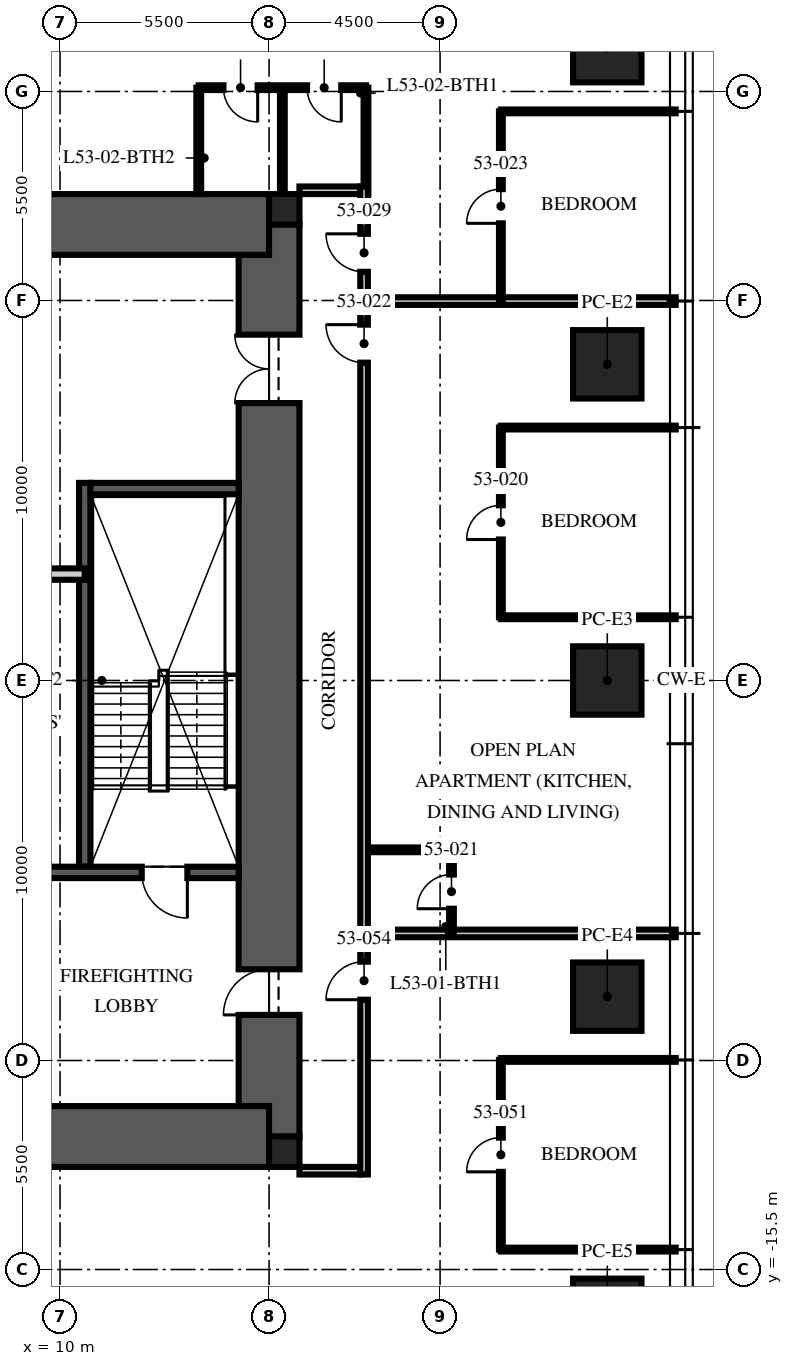
"""IFC4 building model, lengths in metres.
Left out: names, types, materials, properties, quantities, classifications, styles, units other than length and angle.
Written with IfcOpenShell. Run it as: python <this file> out.ifc"""

import sys

from ifc_helpers import new_model, si_unit, direction, frame, frame_2d, origin, origin_2d, place, context, subcontext, project, spatial, rectangle, extrude, element, fill, save


model = new_model("IFC4")
c1 = context("Model", 3, precision=1e-05, world=origin(), true_north=direction((0.0, 1.0)))
c2 = subcontext(c1, "Body", "Model", "MODEL_VIEW")
j1 = project(units=[si_unit("LENGTHUNIT", "METRE"), si_unit("PLANEANGLEUNIT", "RADIAN")], contexts=[c1])
p1 = place(None, origin())
s1 = spatial("IfcSite", under=j1, at=p1, CompositionType="ELEMENT")
p2 = place(p1, origin())
s2 = spatial("IfcBuilding", under=s1, at=p2, CompositionType="ELEMENT")
p3 = place(p2, frame((0.0, 0.0, 214.5)))
s3 = spatial("IfcBuildingStorey", under=s2, at=p3, CompositionType="ELEMENT", Elevation=214.5)
p4 = place(p3, frame((15.5, -12.0, -0.25), z_axis=(0.0, 0.0, 1.0), x_axis=(0.0, 1.0, 0.0)))
e1 = element("IfcWall", 1, at=p4, inside=s3, PredefinedType="SHEAR", context=c2, shape_type="SweptSolid", body=[
    extrude(rectangle(XDim=24.0, YDim=1.6, at=frame_2d((12.0, 0.0))), origin(), (0.0, 0.0, 1.0), 3.75),
])
p5 = place(p4, frame((3.2, 0.0, 0.25)))
e2 = element("IfcOpeningElement", 2, at=p5, cuts=e1, PredefinedType="OPENING", context=c2, shape_type="SweptSolid", body=[
    extrude(rectangle(XDim=1.2, YDim=2.1, at=frame_2d((0.6, 1.05))), frame((0.0, 0.81, 0.0), z_axis=(0.0, -1.0, 0.0), x_axis=(1.0, 0.0, 0.0)), (0.0, 0.0, 1.0), 1.62),
])
p6 = place(p4, frame((19.3, 0.0, 0.25)))
e3 = element("IfcOpeningElement", 3, at=p6, cuts=e1, PredefinedType="OPENING", context=c2, shape_type="SweptSolid", body=[
    extrude(rectangle(XDim=1.8, YDim=2.1, at=frame_2d((0.9, 1.05))), frame((0.0, 0.81, 0.0), z_axis=(0.0, -1.0, 0.0), x_axis=(1.0, 0.0, 0.0)), (0.0, 0.0, 1.0), 1.62),
])
for number, where, z_axis, x_axis in (
    (4, (-15.5, 12.0, -0.25), (0.0, 0.0, 1.0), (1.0, 0.0, 0.0)),
    (5, (-15.5, -12.0, -0.25), (0.0, 0.0, 1.0), (1.0, 0.0, 0.0)),
):
    element("IfcWall", number, at=place(p3, frame(where, z_axis=z_axis, x_axis=x_axis)), inside=s3, PredefinedType="SHEAR", context=c2, shape_type="SweptSolid", body=[
        extrude(rectangle(XDim=31.0, YDim=1.6, at=frame_2d((15.5, 0.0))), origin(), (0.0, 0.0, 1.0), 3.75),
    ])
for number, where, z_axis, x_axis in (
    (6, (15.9, 12.4, -0.25), (0.0, 0.0, 1.0), (1.0, 0.0, 0.0)),
    (7, (15.9, -12.4, -0.25), (0.0, 0.0, 1.0), (1.0, 0.0, 0.0)),
):
    element("IfcColumn", number, at=place(p3, frame(where, z_axis=z_axis, x_axis=x_axis)), inside=s3, PredefinedType="COLUMN", context=c2, shape_type="SweptSolid", body=[
        extrude(rectangle(XDim=0.8, YDim=0.8, at=origin_2d()), origin(), (0.0, 0.0, 1.0), 3.75),
    ])
for number, where, z_axis, x_axis in (
    (8, (24.4, 16.64, 0.0), (0.0, 0.0, 1.0), (0.0, 1.0, 0.0)),
    (9, (24.4, 8.32, 0.0), (0.0, 0.0, 1.0), (0.0, 1.0, 0.0)),
    (10, (24.4, 0.0, 0.0), (0.0, 0.0, 1.0), (0.0, 1.0, 0.0)),
    (11, (24.4, -8.32, 0.0), (0.0, 0.0, 1.0), (0.0, 1.0, 0.0)),
    (12, (24.4, -16.64, 0.0), (0.0, 0.0, 1.0), (0.0, 1.0, 0.0)),
):
    element("IfcColumn", number, at=place(p3, frame(where, z_axis=z_axis, x_axis=x_axis)), inside=s3, PredefinedType="COLUMN", context=c2, shape_type="SweptSolid", body=[
        extrude(rectangle(XDim=1.8, YDim=1.8, at=origin_2d()), origin(), (0.0, 0.0, 1.0), 3.75),
    ])
p7 = place(p3, frame((10.65, -4.9, 0.0), z_axis=(0.0, 0.0, 1.0), x_axis=(0.0, 1.0, 0.0)))
e13 = element("IfcWall", 13, at=p7, inside=s3, PredefinedType="SOLIDWALL", context=c2, shape_type="SweptSolid", body=[
    extrude(rectangle(XDim=10.1, YDim=0.3, at=frame_2d((5.05, 0.0))), origin(), (0.0, 0.0, 1.0), 3.5),
])
p8 = place(p3, frame((14.7, -5.05, 0.0), z_axis=(0.0, 0.0, 1.0), x_axis=(-1.0, 0.0, 0.0)))
e14 = element("IfcWall", 14, at=p8, inside=s3, PredefinedType="SOLIDWALL", context=c2, shape_type="SweptSolid", body=[
    extrude(rectangle(XDim=5.9, YDim=0.3, at=frame_2d((2.95, 0.0))), origin(), (0.0, 0.0, 1.0), 3.5),
])
p9 = place(p8, frame((1.35, 0.0, 0.0)))
e15 = element("IfcOpeningElement", 15, at=p9, cuts=e14, PredefinedType="OPENING", context=c2, shape_type="SweptSolid", body=[
    extrude(rectangle(XDim=1.2, YDim=2.1, at=frame_2d((0.6, 1.05))), frame((0.0, 0.16, 0.0), z_axis=(0.0, -1.0, 0.0), x_axis=(1.0, 0.0, 0.0)), (0.0, 0.0, 1.0), 0.32),
])
p10 = place(p3, frame((14.7, 5.05, 0.0), z_axis=(0.0, 0.0, 1.0), x_axis=(-1.0, 0.0, 0.0)))
e16 = element("IfcWall", 16, at=p10, inside=s3, PredefinedType="SOLIDWALL", context=c2, shape_type="SweptSolid", body=[
    extrude(rectangle(XDim=3.9, YDim=0.3, at=frame_2d((1.95, 0.0))), origin(), (0.0, 0.0, 1.0), 3.5),
])
p11 = place(p3, frame((-10.65, 2.8, 0.0), z_axis=(0.0, 0.0, 1.0), x_axis=(1.0, 0.0, 0.0)))
e17 = element("IfcWall", 17, at=p11, inside=s3, PredefinedType="PARTITIONING", context=c2, shape_type="SweptSolid", body=[
    extrude(rectangle(XDim=21.3, YDim=0.3, at=frame_2d((10.65, 0.0))), origin(), (0.0, 0.0, 1.0), 3.5),
])
p12 = place(p11, frame((10.05, 0.0, 0.0)))
e18 = element("IfcOpeningElement", 18, at=p12, cuts=e17, PredefinedType="OPENING", context=c2, shape_type="SweptSolid", body=[
    extrude(rectangle(XDim=1.2, YDim=2.1, at=frame_2d((0.6, 1.05))), frame((0.0, 0.16, 0.0), z_axis=(0.0, -1.0, 0.0), x_axis=(1.0, 0.0, 0.0)), (0.0, 0.0, 1.0), 0.32),
])
p13 = place(p11, frame((1.493, 0.0, 0.0)))
e19 = element("IfcOpeningElement", 19, at=p13, cuts=e17, PredefinedType="OPENING", context=c2, shape_type="SweptSolid", body=[
    extrude(rectangle(XDim=0.9, YDim=2.1, at=frame_2d((0.45, 1.05))), frame((0.0, 0.16, 0.0), z_axis=(0.0, -1.0, 0.0), x_axis=(1.0, 0.0, 0.0)), (0.0, 0.0, 1.0), 0.32),
])
p14 = place(p11, frame((18.836, 0.0, 0.0)))
e20 = element("IfcOpeningElement", 20, at=p14, cuts=e17, PredefinedType="OPENING", context=c2, shape_type="SweptSolid", body=[
    extrude(rectangle(XDim=0.9, YDim=2.1, at=frame_2d((0.45, 1.05))), frame((0.0, 0.16, 0.0), z_axis=(0.0, -1.0, 0.0), x_axis=(1.0, 0.0, 0.0)), (0.0, 0.0, 1.0), 0.32),
])
for number, where, z_axis, x_axis in (
    (21, (16.3, 12.9, 0.0), (0.0, 0.0, 1.0), (1.0, 0.0, 0.0)),
    (22, (16.3, -12.9, 0.0), (0.0, 0.0, 1.0), (1.0, 0.0, 0.0)),
):
    element("IfcWall", number, at=place(p3, frame(where, z_axis=z_axis, x_axis=x_axis)), inside=s3, PredefinedType="PARTITIONING", context=c2, shape_type="SweptSolid", body=[
        extrude(rectangle(XDim=1.6, YDim=0.2, at=frame_2d((0.8, 0.0))), origin(), (0.0, 0.0, 1.0), 2.3),
    ])
p15 = place(p3, frame((18.1, -6.656, 0.0), z_axis=(0.0, 0.0, 1.0), x_axis=(1.0, 0.0, 0.0)))
e23 = element("IfcWall", 23, at=p15, inside=s3, PredefinedType="PARTITIONING", context=c2, shape_type="SweptSolid", body=[
    extrude(rectangle(XDim=8.1, YDim=0.2, at=frame_2d((4.05, 0.0))), origin(), (0.0, 0.0, 1.0), 2.91),
])
for number, where, z_axis, x_axis in (
    (24, (21.6, 1.664, 0.0), (0.0, 0.0, 1.0), (1.0, 0.0, 0.0)),
    (25, (21.6, 6.656, 0.0), (0.0, 0.0, 1.0), (1.0, 0.0, 0.0)),
):
    element("IfcWall", number, at=place(p3, frame(where, z_axis=z_axis, x_axis=x_axis)), inside=s3, PredefinedType="PARTITIONING", context=c2, shape_type="SweptSolid", body=[
        extrude(rectangle(XDim=4.6, YDim=0.1, at=frame_2d((2.3, 0.0))), origin(), (0.0, 0.0, 1.0), 2.91),
    ])
p16 = place(p3, frame((18.1, 9.984, 0.0), z_axis=(0.0, 0.0, 1.0), x_axis=(1.0, 0.0, 0.0)))
e26 = element("IfcWall", 26, at=p16, inside=s3, PredefinedType="PARTITIONING", context=c2, shape_type="SweptSolid", body=[
    extrude(rectangle(XDim=8.1, YDim=0.2, at=frame_2d((4.05, 0.0))), origin(), (0.0, 0.0, 1.0), 2.91),
])
for number, where, z_axis, x_axis in (
    (27, (21.6, 14.976, 0.0), (0.0, 0.0, 1.0), (1.0, 0.0, 0.0)),
    (28, (21.6, -14.976, 0.0), (0.0, 0.0, 1.0), (1.0, 0.0, 0.0)),
    (29, (21.6, -9.984, 0.0), (0.0, 0.0, 1.0), (1.0, 0.0, 0.0)),
):
    element("IfcWall", number, at=place(p3, frame(where, z_axis=z_axis, x_axis=x_axis)), inside=s3, PredefinedType="PARTITIONING", context=c2, shape_type="SweptSolid", body=[
        extrude(rectangle(XDim=4.6, YDim=0.1, at=frame_2d((2.3, 0.0))), origin(), (0.0, 0.0, 1.0), 2.91),
    ])
p17 = place(p3, frame((21.6, 1.664, 0.0), z_axis=(0.0, 0.0, 1.0), x_axis=(0.0, 1.0, 0.0)))
e30 = element("IfcWall", 30, at=p17, inside=s3, PredefinedType="PARTITIONING", context=c2, shape_type="SweptSolid", body=[
    extrude(rectangle(XDim=4.992, YDim=0.1, at=frame_2d((2.496, 0.0))), origin(), (0.0, 0.0, 1.0), 2.81),
])
p18 = place(p17, frame((2.046, 0.0, 0.0)))
e31 = element("IfcOpeningElement", 31, at=p18, cuts=e30, PredefinedType="OPENING", context=c2, shape_type="SweptSolid", body=[
    extrude(rectangle(XDim=0.9, YDim=2.1, at=frame_2d((0.45, 1.05))), frame((0.0, 0.06, 0.0), z_axis=(0.0, -1.0, 0.0), x_axis=(1.0, 0.0, 0.0)), (0.0, 0.0, 1.0), 0.12),
])
p19 = place(p3, frame((20.3, -6.656, 0.0), z_axis=(0.0, 0.0, 1.0), x_axis=(0.0, 1.0, 0.0)))
e32 = element("IfcWall", 32, at=p19, inside=s3, PredefinedType="PARTITIONING", context=c2, shape_type="SweptSolid", body=[
    extrude(rectangle(XDim=2.2, YDim=0.125, at=frame_2d((1.1, 0.0))), origin(), (0.0, 0.0, 1.0), 3.5),
])
p20 = place(p19, frame((0.65, 0.0, 0.0)))
e33 = element("IfcOpeningElement", 33, at=p20, cuts=e32, PredefinedType="OPENING", context=c2, shape_type="SweptSolid", body=[
    extrude(rectangle(XDim=0.9, YDim=2.1, at=frame_2d((0.45, 1.05))), frame((0.0, 0.073, 0.0), z_axis=(0.0, -1.0, 0.0), x_axis=(1.0, 0.0, 0.0)), (0.0, 0.0, 1.0), 0.145),
])
p21 = place(p3, frame((18.1, -4.456, 0.0), z_axis=(0.0, 0.0, 1.0), x_axis=(1.0, 0.0, 0.0)))
e34 = element("IfcWall", 34, at=p21, inside=s3, PredefinedType="PARTITIONING", context=c2, shape_type="SweptSolid", body=[
    extrude(rectangle(XDim=2.2, YDim=0.125, at=frame_2d((1.1, 0.0))), origin(), (0.0, 0.0, 1.0), 3.5),
])
p22 = place(p3, frame((21.6, 9.984, 0.0), z_axis=(0.0, 0.0, 1.0), x_axis=(0.0, 1.0, 0.0)))
e35 = element("IfcWall", 35, at=p22, inside=s3, PredefinedType="PARTITIONING", context=c2, shape_type="SweptSolid", body=[
    extrude(rectangle(XDim=4.992, YDim=0.1, at=frame_2d((2.496, 0.0))), origin(), (0.0, 0.0, 1.0), 2.81),
])
p23 = place(p22, frame((2.046, 0.0, 0.0)))
e36 = element("IfcOpeningElement", 36, at=p23, cuts=e35, PredefinedType="OPENING", context=c2, shape_type="SweptSolid", body=[
    extrude(rectangle(XDim=0.9, YDim=2.1, at=frame_2d((0.45, 1.05))), frame((0.0, 0.06, 0.0), z_axis=(0.0, -1.0, 0.0), x_axis=(1.0, 0.0, 0.0)), (0.0, 0.0, 1.0), 0.12),
])
p24 = place(p3, frame((18.05, 15.6, 0.0), z_axis=(0.0, 0.0, 1.0), x_axis=(-1.0, 0.0, 0.0)))
e37 = element("IfcWall", 37, at=p24, inside=s3, PredefinedType="PARTITIONING", context=c2, shape_type="SweptSolid", body=[
    extrude(rectangle(XDim=4.4, YDim=0.125, at=frame_2d((2.2, 0.0))), origin(), (0.0, 0.0, 1.0), 2.3),
])
p25 = place(p24, frame((0.65, 0.0, 0.0)))
e38 = element("IfcOpeningElement", 38, at=p25, cuts=e37, PredefinedType="OPENING", context=c2, shape_type="SweptSolid", body=[
    extrude(rectangle(XDim=0.9, YDim=2.1, at=frame_2d((0.45, 1.05))), frame((0.0, 0.073, 0.0), z_axis=(0.0, -1.0, 0.0), x_axis=(1.0, 0.0, 0.0)), (0.0, 0.0, 1.0), 0.145),
])
p26 = place(p24, frame((2.85, 0.0, 0.0)))
e39 = element("IfcOpeningElement", 39, at=p26, cuts=e37, PredefinedType="OPENING", context=c2, shape_type="SweptSolid", body=[
    extrude(rectangle(XDim=0.9, YDim=2.1, at=frame_2d((0.45, 1.05))), frame((0.0, 0.073, 0.0), z_axis=(0.0, -1.0, 0.0), x_axis=(1.0, 0.0, 0.0)), (0.0, 0.0, 1.0), 0.145),
])
for number, where, z_axis, x_axis in (
    (40, (18.05, 12.8, 0.0), (0.0, 0.0, 1.0), (0.0, 1.0, 0.0)),
    (41, (15.85, 12.8, 0.0), (0.0, 0.0, 1.0), (0.0, 1.0, 0.0)),
):
    element("IfcWall", number, at=place(p3, frame(where, z_axis=z_axis, x_axis=x_axis)), inside=s3, PredefinedType="PARTITIONING", context=c2, shape_type="SweptSolid", body=[
        extrude(rectangle(XDim=2.8, YDim=0.125, at=frame_2d((1.4, 0.0))), origin(), (0.0, 0.0, 1.0), 2.3),
    ])
p27 = place(p3, frame((13.65, 12.8, 0.0), z_axis=(0.0, 0.0, 1.0), x_axis=(0.0, 1.0, 0.0)))
e42 = element("IfcWall", 42, at=p27, inside=s3, PredefinedType="PARTITIONING", context=c2, shape_type="SweptSolid", body=[
    extrude(rectangle(XDim=2.8, YDim=0.125, at=frame_2d((1.4, 0.0))), origin(), (0.0, 0.0, 1.0), 3.5),
])
p28 = place(p3, frame((21.6, -14.976, 0.0), z_axis=(0.0, 0.0, 1.0), x_axis=(0.0, 1.0, 0.0)))
e43 = element("IfcWall", 43, at=p28, inside=s3, PredefinedType="PARTITIONING", context=c2, shape_type="SweptSolid", body=[
    extrude(rectangle(XDim=4.992, YDim=0.1, at=frame_2d((2.496, 0.0))), origin(), (0.0, 0.0, 1.0), 2.81),
])
p29 = place(p28, frame((2.046, 0.0, 0.0)))
e44 = element("IfcOpeningElement", 44, at=p29, cuts=e43, PredefinedType="OPENING", context=c2, shape_type="SweptSolid", body=[
    extrude(rectangle(XDim=0.9, YDim=2.1, at=frame_2d((0.45, 1.05))), frame((0.0, 0.06, 0.0), z_axis=(0.0, -1.0, 0.0), x_axis=(1.0, 0.0, 0.0)), (0.0, 0.0, 1.0), 0.12),
])
p30 = place(p3, frame((18.0, -13.0, 0.0), z_axis=(0.0, 0.0, 1.0), x_axis=(0.0, 1.0, 0.0)))
e45 = element("IfcWall", 45, at=p30, inside=s3, PredefinedType="PARTITIONING", context=c2, shape_type="SweptSolid", body=[
    extrude(rectangle(XDim=26.0, YDim=0.2, at=frame_2d((13.0, 0.0))), origin(), (0.0, 0.0, 1.0), 2.6),
])
p31 = place(p30, frame((21.364, 0.0, 0.0)))
e46 = element("IfcOpeningElement", 46, at=p31, cuts=e45, PredefinedType="OPENING", context=c2, shape_type="SweptSolid", body=[
    extrude(rectangle(XDim=1.0, YDim=2.2, at=frame_2d((0.5, 1.1))), frame((0.0, 0.11, 0.0), z_axis=(0.0, -1.0, 0.0), x_axis=(1.0, 0.0, 0.0)), (0.0, 0.0, 1.0), 0.22),
])
p32 = place(p30, frame((23.754, 0.0, 0.0)))
e47 = element("IfcOpeningElement", 47, at=p32, cuts=e45, PredefinedType="OPENING", context=c2, shape_type="SweptSolid", body=[
    extrude(rectangle(XDim=1.0, YDim=2.2, at=frame_2d((0.5, 1.1))), frame((0.0, 0.11, 0.0), z_axis=(0.0, -1.0, 0.0), x_axis=(1.0, 0.0, 0.0)), (0.0, 0.0, 1.0), 0.22),
])
p33 = place(p30, frame((4.6, 0.0, 0.0)))
e48 = element("IfcOpeningElement", 48, at=p33, cuts=e45, PredefinedType="OPENING", context=c2, shape_type="SweptSolid", body=[
    extrude(rectangle(XDim=1.0, YDim=2.2, at=frame_2d((0.5, 1.1))), frame((0.0, 0.11, 0.0), z_axis=(0.0, -1.0, 0.0), x_axis=(1.0, 0.0, 0.0)), (0.0, 0.0, 1.0), 0.22),
])
p34 = place(p9, origin())
e49 = element("IfcDoor", 49, at=p34, inside=s3, OperationType="SINGLE_SWING_LEFT", PredefinedType="DOOR", context=c2, shape_type="SweptSolid", body=[
    extrude(rectangle(XDim=1.2, YDim=2.1, at=frame_2d((0.6, 1.05))), frame((0.0, 0.025, 0.0), z_axis=(0.0, -1.0, 0.0), x_axis=(1.0, 0.0, 0.0)), (0.0, 0.0, 1.0), 0.05),
])
fill(e15, e49)
p35 = place(p5, origin())
e50 = element("IfcDoor", 50, at=p35, inside=s3, OperationType="SINGLE_SWING_LEFT", PredefinedType="DOOR", context=c2, shape_type="SweptSolid", body=[
    extrude(rectangle(XDim=1.2, YDim=2.1, at=frame_2d((0.6, 1.05))), frame((0.0, 0.025, 0.0), z_axis=(0.0, -1.0, 0.0), x_axis=(1.0, 0.0, 0.0)), (0.0, 0.0, 1.0), 0.05),
])
fill(e2, e50)
p36 = place(p6, origin())
e51 = element("IfcDoor", 51, at=p36, inside=s3, OperationType="DOUBLE_DOOR_SINGLE_SWING", PredefinedType="DOOR", context=c2, shape_type="SweptSolid", body=[
    extrude(rectangle(XDim=1.8, YDim=2.1, at=frame_2d((0.9, 1.05))), frame((0.0, 0.025, 0.0), z_axis=(0.0, -1.0, 0.0), x_axis=(1.0, 0.0, 0.0)), (0.0, 0.0, 1.0), 0.05),
])
fill(e3, e51)
p37 = place(p18, origin())
e52 = element("IfcDoor", 52, at=p37, inside=s3, OperationType="SINGLE_SWING_LEFT", PredefinedType="DOOR", context=c2, shape_type="SweptSolid", body=[
    extrude(rectangle(XDim=0.9, YDim=2.1, at=frame_2d((0.45, 1.05))), frame((0.0, 0.025, 0.0), z_axis=(0.0, -1.0, 0.0), x_axis=(1.0, 0.0, 0.0)), (0.0, 0.0, 1.0), 0.05),
])
fill(e31, e52)
p38 = place(p20, origin())
e53 = element("IfcDoor", 53, at=p38, inside=s3, OperationType="SINGLE_SWING_LEFT", PredefinedType="DOOR", context=c2, shape_type="SweptSolid", body=[
    extrude(rectangle(XDim=0.9, YDim=2.1, at=frame_2d((0.45, 1.05))), frame((0.0, 0.025, 0.0), z_axis=(0.0, -1.0, 0.0), x_axis=(1.0, 0.0, 0.0)), (0.0, 0.0, 1.0), 0.05),
])
fill(e33, e53)
p39 = place(p31, origin())
e54 = element("IfcDoor", 54, at=p39, inside=s3, OperationType="SINGLE_SWING_RIGHT", PredefinedType="DOOR", context=c2, shape_type="SweptSolid", body=[
    extrude(rectangle(XDim=1.0, YDim=2.2, at=frame_2d((0.5, 1.1))), frame((0.0, 0.025, 0.0), z_axis=(0.0, -1.0, 0.0), x_axis=(1.0, 0.0, 0.0)), (0.0, 0.0, 1.0), 0.05),
])
fill(e46, e54)
p40 = place(p23, origin())
e55 = element("IfcDoor", 55, at=p40, inside=s3, OperationType="SINGLE_SWING_LEFT", PredefinedType="DOOR", context=c2, shape_type="SweptSolid", body=[
    extrude(rectangle(XDim=0.9, YDim=2.1, at=frame_2d((0.45, 1.05))), frame((0.0, 0.025, 0.0), z_axis=(0.0, -1.0, 0.0), x_axis=(1.0, 0.0, 0.0)), (0.0, 0.0, 1.0), 0.05),
])
fill(e36, e55)
p41 = place(p25, origin())
e56 = element("IfcDoor", 56, at=p41, inside=s3, OperationType="SINGLE_SWING_LEFT", PredefinedType="DOOR", context=c2, shape_type="SweptSolid", body=[
    extrude(rectangle(XDim=0.9, YDim=2.1, at=frame_2d((0.45, 1.05))), frame((0.0, 0.025, 0.0), z_axis=(0.0, -1.0, 0.0), x_axis=(1.0, 0.0, 0.0)), (0.0, 0.0, 1.0), 0.05),
])
fill(e38, e56)
p42 = place(p26, origin())
e57 = element("IfcDoor", 57, at=p42, inside=s3, OperationType="SINGLE_SWING_LEFT", PredefinedType="DOOR", context=c2, shape_type="SweptSolid", body=[
    extrude(rectangle(XDim=0.9, YDim=2.1, at=frame_2d((0.45, 1.05))), frame((0.0, 0.025, 0.0), z_axis=(0.0, -1.0, 0.0), x_axis=(1.0, 0.0, 0.0)), (0.0, 0.0, 1.0), 0.05),
])
fill(e39, e57)
p43 = place(p32, origin())
e58 = element("IfcDoor", 58, at=p43, inside=s3, OperationType="SINGLE_SWING_RIGHT", PredefinedType="DOOR", context=c2, shape_type="SweptSolid", body=[
    extrude(rectangle(XDim=1.0, YDim=2.2, at=frame_2d((0.5, 1.1))), frame((0.0, 0.025, 0.0), z_axis=(0.0, -1.0, 0.0), x_axis=(1.0, 0.0, 0.0)), (0.0, 0.0, 1.0), 0.05),
])
fill(e47, e58)
p44 = place(p29, origin())
e59 = element("IfcDoor", 59, at=p44, inside=s3, OperationType="SINGLE_SWING_LEFT", PredefinedType="DOOR", context=c2, shape_type="SweptSolid", body=[
    extrude(rectangle(XDim=0.9, YDim=2.1, at=frame_2d((0.45, 1.05))), frame((0.0, 0.025, 0.0), z_axis=(0.0, -1.0, 0.0), x_axis=(1.0, 0.0, 0.0)), (0.0, 0.0, 1.0), 0.05),
])
fill(e44, e59)
p45 = place(p33, origin())
e60 = element("IfcDoor", 60, at=p45, inside=s3, OperationType="SINGLE_SWING_LEFT", PredefinedType="DOOR", context=c2, shape_type="SweptSolid", body=[
    extrude(rectangle(XDim=1.0, YDim=2.2, at=frame_2d((0.5, 1.1))), frame((0.0, 0.025, 0.0), z_axis=(0.0, -1.0, 0.0), x_axis=(1.0, 0.0, 0.0)), (0.0, 0.0, 1.0), 0.05),
])
fill(e48, e60)
save(model, sys.argv[1])
